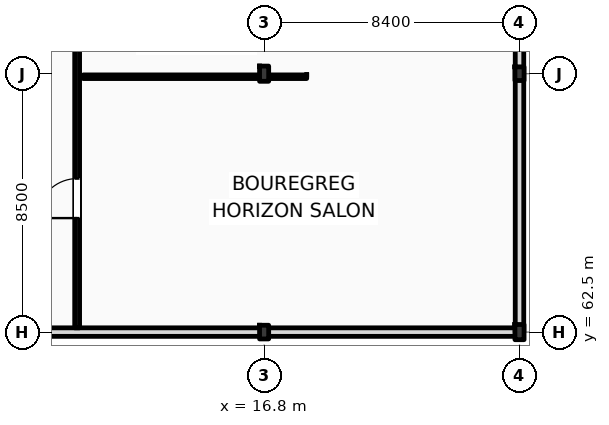
"""IFC4 building model, lengths in metres.
Left out: names, types, materials, properties, quantities, classifications, styles, units other than length and angle.
Written with IfcOpenShell. Run it as: python <this file> out.ifc"""

import sys

from ifc_helpers import new_model, si_unit, direction, frame, frame_2d, origin, origin_2d, place, context, subcontext, project, spatial, rectangle, i_section, extrude, element, fill, save


model = new_model("IFC4")
c1 = context("Model", 3, precision=1e-05, world=origin(), true_north=direction((0.0, 1.0)))
c2 = subcontext(c1, "Body", "Model", "MODEL_VIEW")
j1 = project(units=[si_unit("LENGTHUNIT", "METRE"), si_unit("PLANEANGLEUNIT", "RADIAN")], contexts=[c1])
p1 = place(None, origin())
s1 = spatial("IfcSite", under=j1, at=p1, CompositionType="ELEMENT")
p2 = place(p1, origin())
s2 = spatial("IfcBuilding", under=s1, at=p2, CompositionType="ELEMENT")
p3 = place(p2, frame((0.0, 0.0, 31.8)))
s3 = spatial("IfcBuildingStorey", under=s2, at=p3, CompositionType="ELEMENT", Elevation=31.8)
p4 = place(p3, frame((16.8, 62.5, 0.0), z_axis=(0.0, 0.0, 1.0), x_axis=(1.0, 0.0, 0.0)))
e1 = element("IfcColumn", 1, at=p4, inside=s3, PredefinedType="COLUMN", context=c2, shape_type="SweptSolid", body=[
    extrude(i_section(OverallWidth=0.3, OverallDepth=0.45, WebThickness=0.014, FlangeThickness=0.026, FilletRadius=0.027, at=origin_2d()), origin(), (0.0, 0.0, 1.0), 3.6),
])
for number, where, z_axis, x_axis in (
    (2, (16.8, 71.0, 0.0), (0.0, 0.0, 1.0), (1.0, 0.0, 0.0)),
    (3, (25.2, 62.5, 0.0), (0.0, 0.0, 1.0), (1.0, 0.0, 0.0)),
):
    element("IfcColumn", number, at=place(p3, frame(where, z_axis=z_axis, x_axis=x_axis)), inside=s3, PredefinedType="COLUMN", context=c2, shape_type="SweptSolid", body=[
        extrude(i_section(OverallWidth=0.3, OverallDepth=0.5, WebThickness=0.014, FlangeThickness=0.028, FilletRadius=0.027, at=origin_2d()), origin(), (0.0, 0.0, 1.0), 3.6),
    ])
p5 = place(p3, frame((25.2, 71.0, 0.0), z_axis=(0.0, 0.0, 1.0), x_axis=(1.0, 0.0, 0.0)))
e4 = element("IfcColumn", 4, at=p5, inside=s3, PredefinedType="COLUMN", context=c2, shape_type="SweptSolid", body=[
    extrude(i_section(OverallWidth=0.3, OverallDepth=0.45, WebThickness=0.014, FlangeThickness=0.026, FilletRadius=0.027, at=origin_2d()), origin(), (0.0, 0.0, 1.0), 3.6),
])
p6 = place(p3, frame((0.0, 62.5, 0.0), z_axis=(0.0, 0.0, 1.0), x_axis=(1.0, 0.0, 0.0)))
e5 = element("IfcWall", 5, at=p6, inside=s3, PredefinedType="STANDARD", context=c2, shape_type="SweptSolid", body=[
    extrude(rectangle(XDim=25.2, YDim=0.28, at=frame_2d((12.6, 0.0))), origin(), (0.0, 0.0, 1.0), 2.8),
])
p7 = place(p3, frame((25.2, 62.5, 0.0), z_axis=(0.0, 0.0, 1.0), x_axis=(0.0, 1.0, 0.0)))
e6 = element("IfcWall", 6, at=p7, inside=s3, PredefinedType="STANDARD", context=c2, shape_type="SweptSolid", body=[
    extrude(rectangle(XDim=17.0, YDim=0.28, at=frame_2d((8.5, 0.0))), origin(), (0.0, 0.0, 1.0), 2.99),
])
p8 = place(p3, frame((10.65, 62.64, 0.0), z_axis=(0.0, 0.0, 1.0), x_axis=(0.0, 1.0, 0.0)))
e7 = element("IfcWall", 7, at=p8, inside=s3, PredefinedType="PARTITIONING", context=c2, shape_type="SweptSolid", body=[
    extrude(rectangle(XDim=16.31, YDim=0.16, at=frame_2d((8.155, 0.0))), origin(), (0.0, 0.0, 1.0), 3.36),
])
p9 = place(p8, frame((3.61, 0.0, 0.0)))
e8 = element("IfcOpeningElement", 8, at=p9, cuts=e7, PredefinedType="OPENING", context=c2, shape_type="SweptSolid", body=[
    extrude(rectangle(XDim=1.3, YDim=2.2, at=frame_2d((0.65, 1.1))), frame((0.0, 0.09, 0.0), z_axis=(0.0, -1.0, 0.0), x_axis=(1.0, 0.0, 0.0)), (0.0, 0.0, 1.0), 0.18),
])
p10 = place(p8, frame((9.735, 0.0, 0.0)))
e9 = element("IfcOpeningElement", 9, at=p10, cuts=e7, PredefinedType="OPENING", context=c2, shape_type="SweptSolid", body=[
    extrude(rectangle(XDim=1.05, YDim=2.12, at=frame_2d((0.525, 1.06))), frame((0.0, 0.09, 0.0), z_axis=(0.0, -1.0, 0.0), x_axis=(1.0, 0.0, 0.0)), (0.0, 0.0, 1.0), 0.18),
])
p11 = place(p8, frame((13.49, 0.0, 0.0)))
e10 = element("IfcOpeningElement", 10, at=p11, cuts=e7, PredefinedType="OPENING", context=c2, shape_type="SweptSolid", body=[
    extrude(rectangle(XDim=0.94, YDim=2.15, at=frame_2d((0.47, 1.075))), frame((0.0, 0.09, 0.0), z_axis=(0.0, -1.0, 0.0), x_axis=(1.0, 0.0, 0.0)), (0.0, 0.0, 1.0), 0.18),
])
p12 = place(p3, frame((10.85, 70.9, 0.0), z_axis=(0.0, 0.0, 1.0), x_axis=(1.0, 0.0, 0.0)))
e11 = element("IfcWall", 11, at=p12, inside=s3, PredefinedType="PARTITIONING", context=c2, shape_type="SweptSolid", body=[
    extrude(rectangle(XDim=7.35, YDim=0.12, at=frame_2d((3.675, 0.0))), origin(), (0.0, 0.0, 1.0), 2.8),
])
p13 = place(p9, origin())
e12 = element("IfcDoor", 12, at=p13, inside=s3, OperationType="SINGLE_SWING_LEFT", PredefinedType="DOOR", context=c2, shape_type="SweptSolid", body=[
    extrude(rectangle(XDim=1.3, YDim=2.2, at=frame_2d((0.65, 1.1))), frame((0.0, 0.025, 0.0), z_axis=(0.0, -1.0, 0.0), x_axis=(1.0, 0.0, 0.0)), (0.0, 0.0, 1.0), 0.05),
])
fill(e8, e12)
save(model, sys.argv[1])
